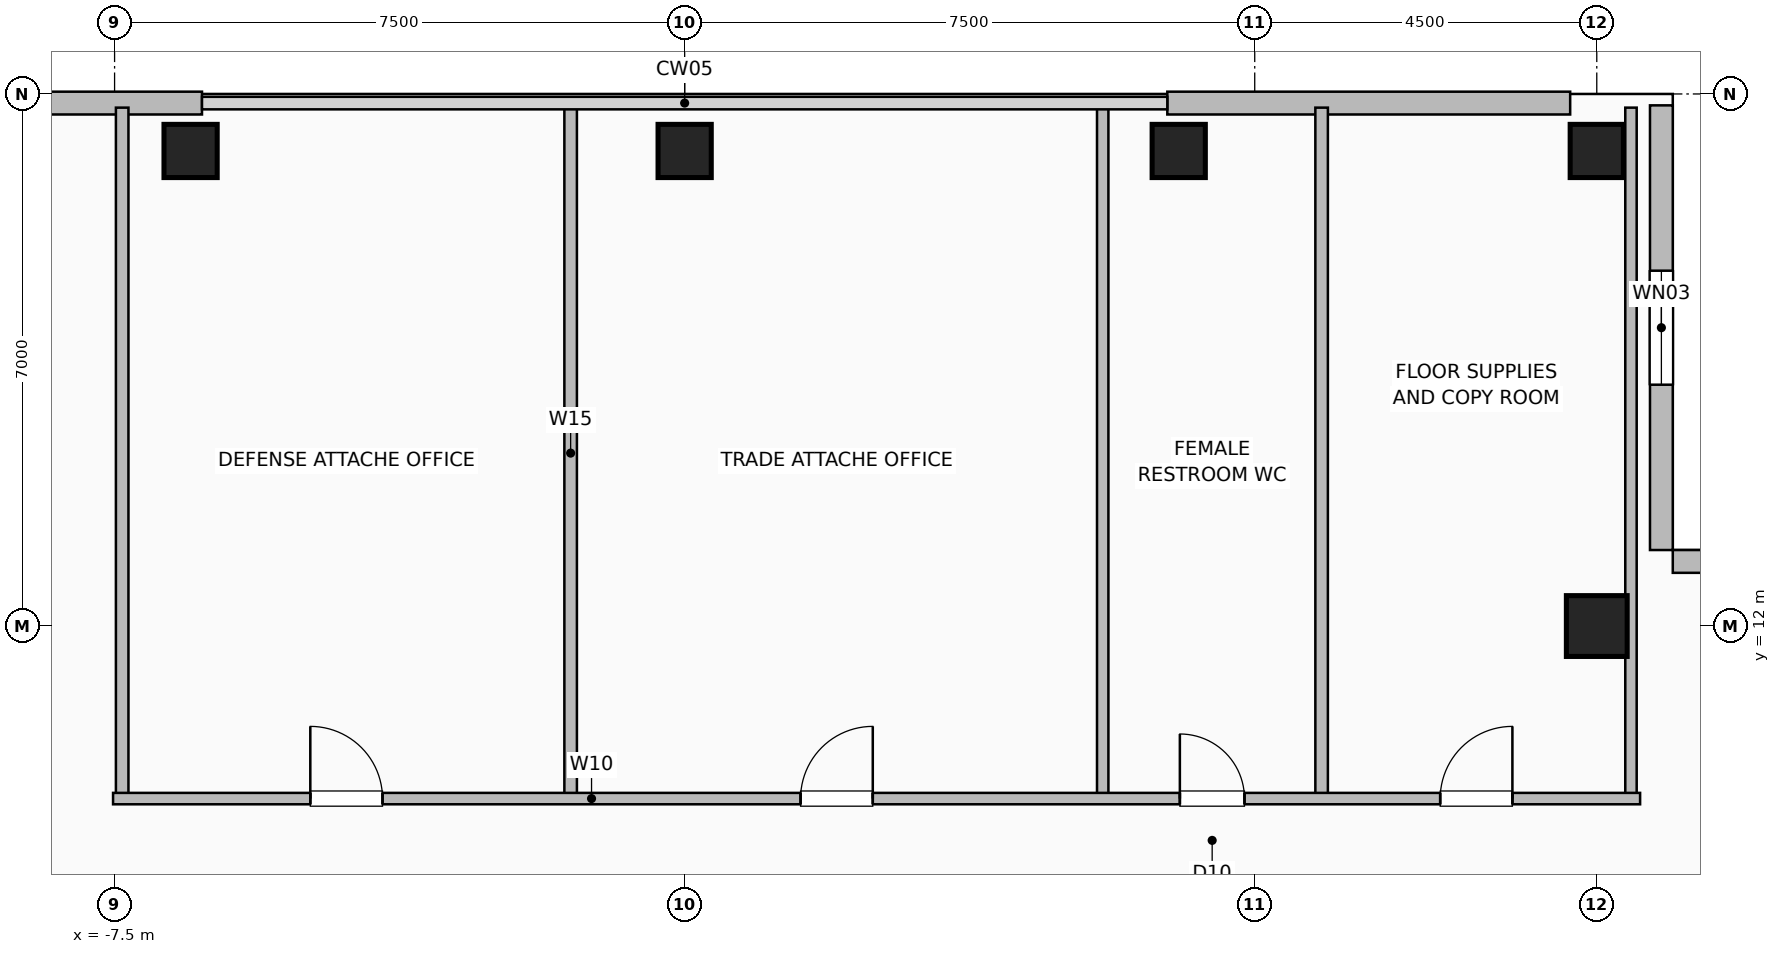
"""IFC4 building model, lengths in metres.
Left out: names, types, materials, properties, quantities, classifications, styles, units other than length and angle.
Written with IfcOpenShell. Run it as: python <this file> out.ifc"""

import sys

from ifc_helpers import new_model, si_unit, direction, frame, frame_2d, origin, origin_2d, place, context, subcontext, project, spatial, rectangle, hollow_rectangle, extrude, element, fill, save


model = new_model("IFC4")
c1 = context("Model", 3, precision=1e-05, world=origin(), true_north=direction((0.0, 1.0)))
c2 = subcontext(c1, "Body", "Model", "MODEL_VIEW")
j1 = project(units=[si_unit("LENGTHUNIT", "METRE"), si_unit("PLANEANGLEUNIT", "RADIAN")], contexts=[c1])
p1 = place(None, origin())
s1 = spatial("IfcSite", under=j1, at=p1, CompositionType="ELEMENT")
p2 = place(p1, origin())
s2 = spatial("IfcBuilding", under=s1, at=p2, CompositionType="ELEMENT")
p3 = place(p2, frame((0.0, 0.0, 236.0)))
s3 = spatial("IfcBuildingStorey", under=s2, at=p3, CompositionType="ELEMENT", Elevation=236.0)
for number, where, z_axis, x_axis in (
    (1, (-6.5, 18.25, 0.0), (0.0, 0.0, 1.0), (1.0, 0.0, 0.0)),
    (2, (0.0, 18.25, 0.0), (0.0, 0.0, 1.0), (1.0, 0.0, 0.0)),
    (3, (6.5, 18.25, 0.0), (0.0, 0.0, 1.0), (1.0, 0.0, 0.0)),
    (4, (12.0, 18.25, 0.0), (0.0, 0.0, 1.0), (1.0, 0.0, 0.0)),
):
    element("IfcColumn", number, at=place(p3, frame(where, z_axis=z_axis, x_axis=x_axis)), inside=s3, PredefinedType="COLUMN", context=c2, shape_type="SweptSolid", body=[
        extrude(hollow_rectangle(XDim=0.7, YDim=0.7, WallThickness=0.035, at=origin_2d()), origin(), (0.0, 0.0, 1.0), 3.6),
    ])
p4 = place(p3, frame((12.0, 12.0, 0.0), z_axis=(0.0, 0.0, 1.0), x_axis=(1.0, 0.0, 0.0)))
e5 = element("IfcColumn", 5, at=p4, inside=s3, PredefinedType="COLUMN", context=c2, shape_type="SweptSolid", body=[
    extrude(hollow_rectangle(XDim=0.8, YDim=0.8, WallThickness=0.04, at=origin_2d()), origin(), (0.0, 0.0, 1.0), 3.6),
])
for number, where, z_axis, x_axis in (
    (6, (-11.65, 18.88, 0.0), (0.0, 0.0, 1.0), (1.0, 0.0, 0.0)),
    (7, (6.35, 18.88, 0.0), (0.0, 0.0, 1.0), (1.0, 0.0, 0.0)),
):
    element("IfcWall", number, at=place(p3, frame(where, z_axis=z_axis, x_axis=x_axis)), inside=s3, PredefinedType="SOLIDWALL", context=c2, shape_type="SweptSolid", body=[
        extrude(rectangle(XDim=5.3, YDim=0.3, at=frame_2d((2.65, 0.0))), origin(), (0.0, 0.0, 1.0), 3.36),
    ])
p5 = place(p3, frame((12.85, 18.85, 0.0), z_axis=(0.0, 0.0, 1.0), x_axis=(0.0, -1.0, 0.0)))
e8 = element("IfcWall", 8, at=p5, inside=s3, PredefinedType="SOLIDWALL", context=c2, shape_type="SweptSolid", body=[
    extrude(rectangle(XDim=5.85, YDim=0.3, at=frame_2d((2.925, 0.0))), origin(), (0.0, 0.0, 1.0), 3.36),
])
p6 = place(p5, frame((2.175, 0.0, 0.9)))
e9 = element("IfcOpeningElement", 9, at=p6, cuts=e8, PredefinedType="OPENING", context=c2, shape_type="SweptSolid", body=[
    extrude(rectangle(XDim=1.5, YDim=1.8, at=frame_2d((0.75, 0.9))), frame((0.0, 0.16, 0.0), z_axis=(0.0, -1.0, 0.0), x_axis=(1.0, 0.0, 0.0)), (0.0, 0.0, 1.0), 0.32),
])
p7 = place(p3, frame((18.85, 12.85, 0.0), z_axis=(0.0, 0.0, 1.0), x_axis=(-1.0, 0.0, 0.0)))
e10 = element("IfcWall", 10, at=p7, inside=s3, PredefinedType="SOLIDWALL", context=c2, shape_type="SweptSolid", body=[
    extrude(rectangle(XDim=5.85, YDim=0.3, at=frame_2d((2.925, 0.0))), origin(), (0.0, 0.0, 1.0), 3.36),
])
for number, where, z_axis, x_axis in (
    (11, (8.38, 9.73, 0.0), (0.0, 0.0, 1.0), (0.0, 1.0, 0.0)),
    (12, (-7.4, 9.73, 0.0), (0.0, 0.0, 1.0), (0.0, 1.0, 0.0)),
    (13, (-1.5, 9.73, 0.0), (0.0, 0.0, 1.0), (0.0, 1.0, 0.0)),
):
    element("IfcWall", number, at=place(p3, frame(where, z_axis=z_axis, x_axis=x_axis)), inside=s3, PredefinedType="PLUMBINGWALL", context=c2, shape_type="SweptSolid", body=[
        extrude(rectangle(XDim=9.09, YDim=0.165, at=frame_2d((4.545, 0.0))), origin(), (0.0, 0.0, 1.0), 3.36),
    ])
for number, where, z_axis, x_axis in (
    (14, (5.5, 9.73, 0.0), (0.0, 0.0, 1.0), (0.0, 1.0, 0.0)),
    (15, (12.45, 9.73, 0.0), (0.0, 0.0, 1.0), (0.0, 1.0, 0.0)),
):
    element("IfcWall", number, at=place(p3, frame(where, z_axis=z_axis, x_axis=x_axis)), inside=s3, PredefinedType="PARTITIONING", context=c2, shape_type="SweptSolid", body=[
        extrude(rectangle(XDim=9.09, YDim=0.15, at=frame_2d((4.545, 0.0))), origin(), (0.0, 0.0, 1.0), 3.36),
    ])
p8 = place(p3, frame((-7.52, 9.73, 0.0), z_axis=(0.0, 0.0, 1.0), x_axis=(1.0, 0.0, 0.0)))
e16 = element("IfcWall", 16, at=p8, inside=s3, PredefinedType="PARTITIONING", context=c2, shape_type="SweptSolid", body=[
    extrude(rectangle(XDim=20.09, YDim=0.15, at=frame_2d((10.045, 0.0))), origin(), (0.0, 0.0, 1.0), 3.36),
])
p9 = place(p8, frame((2.595, 0.0, 0.0)))
e17 = element("IfcOpeningElement", 17, at=p9, cuts=e16, PredefinedType="OPENING", context=c2, shape_type="SweptSolid", body=[
    extrude(rectangle(XDim=0.95, YDim=2.06, at=frame_2d((0.475, 1.03))), frame((0.0, 0.085, 0.0), z_axis=(0.0, -1.0, 0.0), x_axis=(1.0, 0.0, 0.0)), (0.0, 0.0, 1.0), 0.17),
])
p10 = place(p8, frame((9.045, 0.0, 0.0)))
e18 = element("IfcOpeningElement", 18, at=p10, cuts=e16, PredefinedType="OPENING", context=c2, shape_type="SweptSolid", body=[
    extrude(rectangle(XDim=0.95, YDim=2.06, at=frame_2d((0.475, 1.03))), frame((0.0, 0.085, 0.0), z_axis=(0.0, -1.0, 0.0), x_axis=(1.0, 0.0, 0.0)), (0.0, 0.0, 1.0), 0.17),
])
p11 = place(p8, frame((14.035, 0.0, 0.0)))
e19 = element("IfcOpeningElement", 19, at=p11, cuts=e16, PredefinedType="OPENING", context=c2, shape_type="SweptSolid", body=[
    extrude(rectangle(XDim=0.85, YDim=2.05, at=frame_2d((0.425, 1.025))), frame((0.0, 0.085, 0.0), z_axis=(0.0, -1.0, 0.0), x_axis=(1.0, 0.0, 0.0)), (0.0, 0.0, 1.0), 0.17),
])
p12 = place(p8, frame((17.46, 0.0, 0.0)))
e20 = element("IfcOpeningElement", 20, at=p12, cuts=e16, PredefinedType="OPENING", context=c2, shape_type="SweptSolid", body=[
    extrude(rectangle(XDim=0.95, YDim=2.06, at=frame_2d((0.475, 1.03))), frame((0.0, 0.085, 0.0), z_axis=(0.0, -1.0, 0.0), x_axis=(1.0, 0.0, 0.0)), (0.0, 0.0, 1.0), 0.17),
])
p13 = place(p6, origin())
e21 = element("IfcWindow", 21, at=p13, inside=s3, PartitioningType="SINGLE_PANEL", PredefinedType="WINDOW", context=c2, shape_type="SweptSolid", body=[
    extrude(rectangle(XDim=1.5, YDim=1.8, at=frame_2d((0.75, 0.9))), frame((0.0, 0.03, 0.0), z_axis=(0.0, -1.0, 0.0), x_axis=(1.0, 0.0, 0.0)), (0.0, 0.0, 1.0), 0.06),
])
fill(e9, e21)
p14 = place(p9, origin())
e22 = element("IfcDoor", 22, at=p14, inside=s3, OperationType="SINGLE_SWING_LEFT", PredefinedType="DOOR", context=c2, shape_type="SweptSolid", body=[
    extrude(rectangle(XDim=0.95, YDim=2.06, at=frame_2d((0.475, 1.03))), frame((0.0, 0.025, 0.0), z_axis=(0.0, -1.0, 0.0), x_axis=(1.0, 0.0, 0.0)), (0.0, 0.0, 1.0), 0.05),
])
fill(e17, e22)
p15 = place(p10, origin())
e23 = element("IfcDoor", 23, at=p15, inside=s3, OperationType="SINGLE_SWING_RIGHT", PredefinedType="DOOR", context=c2, shape_type="SweptSolid", body=[
    extrude(rectangle(XDim=0.95, YDim=2.06, at=frame_2d((0.475, 1.03))), frame((0.0, 0.025, 0.0), z_axis=(0.0, -1.0, 0.0), x_axis=(1.0, 0.0, 0.0)), (0.0, 0.0, 1.0), 0.05),
])
fill(e18, e23)
p16 = place(p11, origin())
e24 = element("IfcDoor", 24, at=p16, inside=s3, OperationType="SINGLE_SWING_LEFT", PredefinedType="DOOR", context=c2, shape_type="SweptSolid", body=[
    extrude(rectangle(XDim=0.85, YDim=2.05, at=frame_2d((0.425, 1.025))), frame((0.0, 0.025, 0.0), z_axis=(0.0, -1.0, 0.0), x_axis=(1.0, 0.0, 0.0)), (0.0, 0.0, 1.0), 0.05),
])
fill(e19, e24)
p17 = place(p12, origin())
e25 = element("IfcDoor", 25, at=p17, inside=s3, OperationType="SINGLE_SWING_RIGHT", PredefinedType="DOOR", context=c2, shape_type="SweptSolid", body=[
    extrude(rectangle(XDim=0.95, YDim=2.06, at=frame_2d((0.475, 1.03))), frame((0.0, 0.025, 0.0), z_axis=(0.0, -1.0, 0.0), x_axis=(1.0, 0.0, 0.0)), (0.0, 0.0, 1.0), 0.05),
])
fill(e20, e25)
save(model, sys.argv[1])
